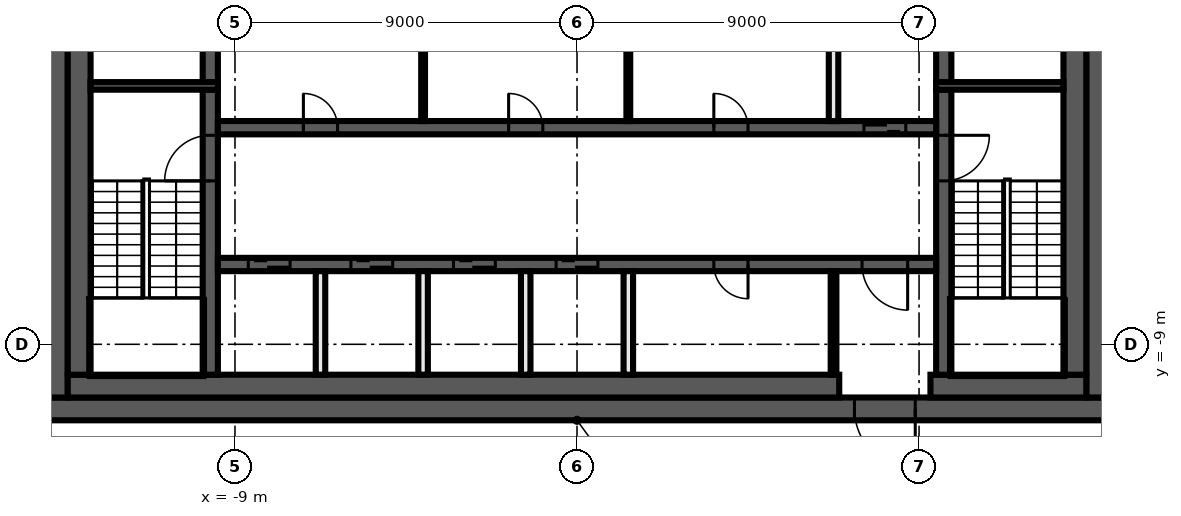
"""IFC4 building model, lengths in metres.
Left out: names, types, materials, properties, quantities, classifications, styles, units other than length and angle.
Written with IfcOpenShell. Run it as: python <this file> out.ifc"""

import sys

from ifc_helpers import new_model, si_unit, direction, frame, frame_2d, origin, place, context, subcontext, project, spatial, rectangle, extrude, element, fill, save


model = new_model("IFC4")
c1 = context("Model", 3, precision=1e-05, world=origin(), true_north=direction((0.0, 1.0)))
c2 = subcontext(c1, "Body", "Model", "MODEL_VIEW")
j1 = project(units=[si_unit("LENGTHUNIT", "METRE"), si_unit("PLANEANGLEUNIT", "RADIAN")], contexts=[c1])
p1 = place(None, origin())
s1 = spatial("IfcSite", under=j1, at=p1, CompositionType="ELEMENT")
p2 = place(p1, origin())
s2 = spatial("IfcBuilding", under=s1, at=p2, CompositionType="ELEMENT")
p3 = place(p2, frame((0.0, 0.0, 323.6)))
s3 = spatial("IfcBuildingStorey", under=s2, at=p3, CompositionType="ELEMENT", Elevation=323.6)
p4 = place(p3, frame((14.0, -10.7, 0.0), z_axis=(0.0, 0.0, 1.0), x_axis=(-1.0, 0.0, 0.0)))
e1 = element("IfcWall", 1, at=p4, inside=s3, PredefinedType="SHEAR", context=c2, shape_type="SweptSolid", body=[
    extrude(rectangle(XDim=28.0, YDim=0.6, at=frame_2d((14.0, 0.0))), origin(), (0.0, 0.0, 1.0), 3.82),
])
p5 = place(p4, frame((5.1, 0.0, 0.0)))
e2 = element("IfcOpeningElement", 2, at=p5, cuts=e1, PredefinedType="OPENING", context=c2, shape_type="SweptSolid", body=[
    extrude(rectangle(XDim=1.6, YDim=2.1, at=frame_2d((0.8, 1.05))), frame((0.0, 0.31, 0.0), z_axis=(0.0, -1.0, 0.0), x_axis=(1.0, 0.0, 0.0)), (0.0, 0.0, 1.0), 0.62),
])
for number, where, z_axis, x_axis in (
    (3, (13.7, 10.4, 0.0), (0.0, 0.0, 1.0), (0.0, -1.0, 0.0)),
    (4, (-13.7, -10.4, 0.0), (0.0, 0.0, 1.0), (0.0, 1.0, 0.0)),
):
    element("IfcWall", number, at=place(p3, frame(where, z_axis=z_axis, x_axis=x_axis)), inside=s3, PredefinedType="SHEAR", context=c2, shape_type="SweptSolid", body=[
        extrude(rectangle(XDim=20.8, YDim=0.6, at=frame_2d((10.4, 0.0))), origin(), (0.0, 0.0, 1.0), 3.82),
    ])
p6 = place(p3, frame((13.4, -10.1, 0.0), z_axis=(0.0, 0.0, 1.0), x_axis=(-1.0, 0.0, 0.0)))
e5 = element("IfcWall", 5, at=p6, inside=s3, PredefinedType="SHEAR", context=c2, shape_type="SweptSolid", body=[
    extrude(rectangle(XDim=4.1, YDim=0.6, at=frame_2d((2.05, 0.0))), origin(), (0.0, 0.0, 1.0), 3.82),
])
p7 = place(p3, frame((6.9, -10.1, 0.0), z_axis=(0.0, 0.0, 1.0), x_axis=(-1.0, 0.0, 0.0)))
e6 = element("IfcWall", 6, at=p7, inside=s3, PredefinedType="SHEAR", context=c2, shape_type="SweptSolid", body=[
    extrude(rectangle(XDim=20.3, YDim=0.6, at=frame_2d((10.15, 0.0))), origin(), (0.0, 0.0, 1.0), 3.82),
])
for number, where, z_axis, x_axis in (
    (7, (13.1, 9.8, 0.0), (0.0, 0.0, 1.0), (0.0, -1.0, 0.0)),
    (8, (-13.1, -9.8, 0.0), (0.0, 0.0, 1.0), (0.0, 1.0, 0.0)),
):
    element("IfcWall", number, at=place(p3, frame(where, z_axis=z_axis, x_axis=x_axis)), inside=s3, PredefinedType="SHEAR", context=c2, shape_type="SweptSolid", body=[
        extrude(rectangle(XDim=19.6, YDim=0.6, at=frame_2d((9.8, 0.0))), origin(), (0.0, 0.0, 1.0), 3.82),
    ])
p8 = place(p3, frame((9.65, -2.3, 0.0), z_axis=(0.0, 0.0, 1.0), x_axis=(0.0, -1.0, 0.0)))
e9 = element("IfcWall", 9, at=p8, inside=s3, PredefinedType="SHEAR", context=c2, shape_type="SweptSolid", body=[
    extrude(rectangle(XDim=7.5, YDim=0.4, at=frame_2d((3.75, 0.0))), origin(), (0.0, 0.0, 1.0), 3.82),
])
p9 = place(p8, frame((1.2, 0.0, 0.0)))
e10 = element("IfcOpeningElement", 10, at=p9, cuts=e9, PredefinedType="OPENING", context=c2, shape_type="SweptSolid", body=[
    extrude(rectangle(XDim=1.2, YDim=2.1, at=frame_2d((0.6, 1.05))), frame((0.0, 0.21, 0.0), z_axis=(0.0, -1.0, 0.0), x_axis=(1.0, 0.0, 0.0)), (0.0, 0.0, 1.0), 0.42),
])
p10 = place(p3, frame((9.65, 2.1, 0.0), z_axis=(0.0, 0.0, 1.0), x_axis=(0.0, -1.0, 0.0)))
e11 = element("IfcWall", 11, at=p10, inside=s3, PredefinedType="SHEAR", context=c2, shape_type="SweptSolid", body=[
    extrude(rectangle(XDim=4.2, YDim=0.4, at=frame_2d((2.1, 0.0))), origin(), (0.0, 0.0, 1.0), 3.82),
])
p11 = place(p10, frame((0.15, 0.0, 0.0)))
e12 = element("IfcOpeningElement", 12, at=p11, cuts=e11, PredefinedType="OPENING", context=c2, shape_type="SweptSolid", body=[
    extrude(rectangle(XDim=0.9, YDim=2.1, at=frame_2d((0.45, 1.05))), frame((0.0, 0.21, 0.0), z_axis=(0.0, -1.0, 0.0), x_axis=(1.0, 0.0, 0.0)), (0.0, 0.0, 1.0), 0.42),
])
p12 = place(p3, frame((-9.65, -9.8, 0.0), z_axis=(0.0, 0.0, 1.0), x_axis=(0.0, 1.0, 0.0)))
e13 = element("IfcWall", 13, at=p12, inside=s3, PredefinedType="SHEAR", context=c2, shape_type="SweptSolid", body=[
    extrude(rectangle(XDim=7.5, YDim=0.4, at=frame_2d((3.75, 0.0))), origin(), (0.0, 0.0, 1.0), 3.82),
])
p13 = place(p12, frame((5.1, 0.0, 0.0)))
e14 = element("IfcOpeningElement", 14, at=p13, cuts=e13, PredefinedType="OPENING", context=c2, shape_type="SweptSolid", body=[
    extrude(rectangle(XDim=1.2, YDim=2.1, at=frame_2d((0.6, 1.05))), frame((0.0, 0.21, 0.0), z_axis=(0.0, -1.0, 0.0), x_axis=(1.0, 0.0, 0.0)), (0.0, 0.0, 1.0), 0.42),
])
p14 = place(p3, frame((-9.65, -2.1, 0.0), z_axis=(0.0, 0.0, 1.0), x_axis=(0.0, 1.0, 0.0)))
e15 = element("IfcWall", 15, at=p14, inside=s3, PredefinedType="SHEAR", context=c2, shape_type="SweptSolid", body=[
    extrude(rectangle(XDim=4.2, YDim=0.4, at=frame_2d((2.1, 0.0))), origin(), (0.0, 0.0, 1.0), 3.82),
])
for number, where, z_axis, x_axis in (
    (16, (9.45, -2.2, 0.0), (0.0, 0.0, 1.0), (1.0, 0.0, 0.0)),
    (17, (-9.45, -2.2, 0.0), (0.0, 0.0, 1.0), (-1.0, 0.0, 0.0)),
):
    element("IfcWall", number, at=place(p3, frame(where, z_axis=z_axis, x_axis=x_axis)), inside=s3, PredefinedType="SHEAR", context=c2, shape_type="SweptSolid", body=[
        extrude(rectangle(XDim=3.35, YDim=0.2, at=frame_2d((1.675, 0.0))), origin(), (0.0, 0.0, 1.0), 3.82),
    ])
p15 = place(p3, frame((-9.45, -3.3, 0.0), z_axis=(0.0, 0.0, 1.0), x_axis=(1.0, 0.0, 0.0)))
e18 = element("IfcWall", 18, at=p15, inside=s3, PredefinedType="SHEAR", context=c2, shape_type="SweptSolid", body=[
    extrude(rectangle(XDim=18.9, YDim=0.35, at=frame_2d((9.45, 0.0))), origin(), (0.0, 0.0, 1.0), 3.82),
])
p16 = place(p15, frame((17.0, 0.0, 0.0)))
e19 = element("IfcOpeningElement", 19, at=p16, cuts=e18, PredefinedType="OPENING", context=c2, shape_type="SweptSolid", body=[
    extrude(rectangle(XDim=1.1, YDim=2.1, at=frame_2d((0.55, 1.05))), frame((0.0, 0.185, 0.0), z_axis=(0.0, -1.0, 0.0), x_axis=(1.0, 0.0, 0.0)), (0.0, 0.0, 1.0), 0.37),
])
p17 = place(p15, frame((2.25, 0.0, 0.0)))
e20 = element("IfcOpeningElement", 20, at=p17, cuts=e18, PredefinedType="OPENING", context=c2, shape_type="SweptSolid", body=[
    extrude(rectangle(XDim=0.9, YDim=2.1, at=frame_2d((0.45, 1.05))), frame((0.0, 0.185, 0.0), z_axis=(0.0, -1.0, 0.0), x_axis=(1.0, 0.0, 0.0)), (0.0, 0.0, 1.0), 0.37),
])
p18 = place(p15, frame((7.65, 0.0, 0.0)))
e21 = element("IfcOpeningElement", 21, at=p18, cuts=e18, PredefinedType="OPENING", context=c2, shape_type="SweptSolid", body=[
    extrude(rectangle(XDim=0.9, YDim=2.1, at=frame_2d((0.45, 1.05))), frame((0.0, 0.185, 0.0), z_axis=(0.0, -1.0, 0.0), x_axis=(1.0, 0.0, 0.0)), (0.0, 0.0, 1.0), 0.37),
])
p19 = place(p15, frame((13.05, 0.0, 0.0)))
e22 = element("IfcOpeningElement", 22, at=p19, cuts=e18, PredefinedType="OPENING", context=c2, shape_type="SweptSolid", body=[
    extrude(rectangle(XDim=0.9, YDim=2.1, at=frame_2d((0.45, 1.05))), frame((0.0, 0.185, 0.0), z_axis=(0.0, -1.0, 0.0), x_axis=(1.0, 0.0, 0.0)), (0.0, 0.0, 1.0), 0.37),
])
p20 = place(p3, frame((9.45, -6.9, 0.0), z_axis=(0.0, 0.0, 1.0), x_axis=(-1.0, 0.0, 0.0)))
e23 = element("IfcWall", 23, at=p20, inside=s3, PredefinedType="SHEAR", context=c2, shape_type="SweptSolid", body=[
    extrude(rectangle(XDim=18.9, YDim=0.35, at=frame_2d((9.45, 0.0))), origin(), (0.0, 0.0, 1.0), 3.82),
])
p21 = place(p20, frame((17.0, 0.0, 0.0)))
e24 = element("IfcOpeningElement", 24, at=p21, cuts=e23, PredefinedType="OPENING", context=c2, shape_type="SweptSolid", body=[
    extrude(rectangle(XDim=1.1, YDim=2.1, at=frame_2d((0.55, 1.05))), frame((0.0, 0.185, 0.0), z_axis=(0.0, -1.0, 0.0), x_axis=(1.0, 0.0, 0.0)), (0.0, 0.0, 1.0), 0.37),
])
p22 = place(p20, frame((14.3, 0.0, 0.0)))
e25 = element("IfcOpeningElement", 25, at=p22, cuts=e23, PredefinedType="OPENING", context=c2, shape_type="SweptSolid", body=[
    extrude(rectangle(XDim=1.1, YDim=2.1, at=frame_2d((0.55, 1.05))), frame((0.0, 0.185, 0.0), z_axis=(0.0, -1.0, 0.0), x_axis=(1.0, 0.0, 0.0)), (0.0, 0.0, 1.0), 0.37),
])
p23 = place(p20, frame((11.6, 0.0, 0.0)))
e26 = element("IfcOpeningElement", 26, at=p23, cuts=e23, PredefinedType="OPENING", context=c2, shape_type="SweptSolid", body=[
    extrude(rectangle(XDim=1.1, YDim=2.1, at=frame_2d((0.55, 1.05))), frame((0.0, 0.185, 0.0), z_axis=(0.0, -1.0, 0.0), x_axis=(1.0, 0.0, 0.0)), (0.0, 0.0, 1.0), 0.37),
])
p24 = place(p20, frame((8.9, 0.0, 0.0)))
e27 = element("IfcOpeningElement", 27, at=p24, cuts=e23, PredefinedType="OPENING", context=c2, shape_type="SweptSolid", body=[
    extrude(rectangle(XDim=1.1, YDim=2.1, at=frame_2d((0.55, 1.05))), frame((0.0, 0.185, 0.0), z_axis=(0.0, -1.0, 0.0), x_axis=(1.0, 0.0, 0.0)), (0.0, 0.0, 1.0), 0.37),
])
p25 = place(p20, frame((0.75, 0.0, 0.0)))
e28 = element("IfcOpeningElement", 28, at=p25, cuts=e23, PredefinedType="OPENING", context=c2, shape_type="SweptSolid", body=[
    extrude(rectangle(XDim=1.2, YDim=2.1, at=frame_2d((0.6, 1.05))), frame((0.0, 0.185, 0.0), z_axis=(0.0, -1.0, 0.0), x_axis=(1.0, 0.0, 0.0)), (0.0, 0.0, 1.0), 0.37),
])
p26 = place(p20, frame((4.95, 0.0, 0.0)))
e29 = element("IfcOpeningElement", 29, at=p26, cuts=e23, PredefinedType="OPENING", context=c2, shape_type="SweptSolid", body=[
    extrude(rectangle(XDim=0.9, YDim=2.1, at=frame_2d((0.45, 1.05))), frame((0.0, 0.185, 0.0), z_axis=(0.0, -1.0, 0.0), x_axis=(1.0, 0.0, 0.0)), (0.0, 0.0, 1.0), 0.37),
])
p27 = place(p3, frame((6.75, -9.8, 0.0), z_axis=(0.0, 0.0, 1.0), x_axis=(0.0, 1.0, 0.0)))
e30 = element("IfcWall", 30, at=p27, inside=s3, PredefinedType="PARTITIONING", context=c2, shape_type="SweptSolid", body=[
    extrude(rectangle(XDim=2.725, YDim=0.15, at=frame_2d((1.363, 0.0))), origin(), (0.0, 0.0, 1.0), 3.82),
])
p28 = place(p3, frame((6.75, -3.125, 0.0), z_axis=(0.0, 0.0, 1.0), x_axis=(0.0, 1.0, 0.0)))
e31 = element("IfcWall", 31, at=p28, inside=s3, PredefinedType="SOLIDWALL", context=c2, shape_type="SweptSolid", body=[
    extrude(rectangle(XDim=2.725, YDim=0.25, at=frame_2d((1.363, 0.0))), origin(), (0.0, 0.0, 1.0), 3.82),
])
p29 = place(p3, frame((1.35, -3.125, 0.0), z_axis=(0.0, 0.0, 1.0), x_axis=(0.0, 1.0, 0.0)))
e32 = element("IfcWall", 32, at=p29, inside=s3, PredefinedType="PARTITIONING", context=c2, shape_type="SweptSolid", body=[
    extrude(rectangle(XDim=2.725, YDim=0.1, at=frame_2d((1.363, 0.0))), origin(), (0.0, 0.0, 1.0), 3.82),
])
for number, where, z_axis, x_axis in (
    (33, (1.35, -9.8, 0.0), (0.0, 0.0, 1.0), (0.0, 1.0, 0.0)),
    (34, (-1.35, -9.8, 0.0), (0.0, 0.0, 1.0), (0.0, 1.0, 0.0)),
):
    element("IfcWall", number, at=place(p3, frame(where, z_axis=z_axis, x_axis=x_axis)), inside=s3, PredefinedType="SOLIDWALL", context=c2, shape_type="SweptSolid", body=[
        extrude(rectangle(XDim=2.725, YDim=0.25, at=frame_2d((1.363, 0.0))), origin(), (0.0, 0.0, 1.0), 3.82),
    ])
p30 = place(p3, frame((-4.05, -3.125, 0.0), z_axis=(0.0, 0.0, 1.0), x_axis=(0.0, 1.0, 0.0)))
e35 = element("IfcWall", 35, at=p30, inside=s3, PredefinedType="PARTITIONING", context=c2, shape_type="SweptSolid", body=[
    extrude(rectangle(XDim=2.725, YDim=0.1, at=frame_2d((1.363, 0.0))), origin(), (0.0, 0.0, 1.0), 3.82),
])
for number, where, z_axis, x_axis in (
    (36, (-4.05, -9.8, 0.0), (0.0, 0.0, 1.0), (0.0, 1.0, 0.0)),
    (37, (-6.75, -9.8, 0.0), (0.0, 0.0, 1.0), (0.0, 1.0, 0.0)),
):
    element("IfcWall", number, at=place(p3, frame(where, z_axis=z_axis, x_axis=x_axis)), inside=s3, PredefinedType="SOLIDWALL", context=c2, shape_type="SweptSolid", body=[
        extrude(rectangle(XDim=2.725, YDim=0.25, at=frame_2d((1.363, 0.0))), origin(), (0.0, 0.0, 1.0), 3.82),
    ])
p31 = place(p16, origin())
e38 = element("IfcDoor", 38, at=p31, inside=s3, OperationType="DOUBLE_DOOR_SLIDING", PredefinedType="DOOR", context=c2, shape_type="SweptSolid", body=[
    extrude(rectangle(XDim=1.1, YDim=2.1, at=frame_2d((0.55, 1.05))), frame((0.0, 0.025, 0.0), z_axis=(0.0, -1.0, 0.0), x_axis=(1.0, 0.0, 0.0)), (0.0, 0.0, 1.0), 0.05),
])
fill(e19, e38)
p32 = place(p21, origin())
e39 = element("IfcDoor", 39, at=p32, inside=s3, OperationType="DOUBLE_DOOR_SLIDING", PredefinedType="DOOR", context=c2, shape_type="SweptSolid", body=[
    extrude(rectangle(XDim=1.1, YDim=2.1, at=frame_2d((0.55, 1.05))), frame((0.0, 0.025, 0.0), z_axis=(0.0, -1.0, 0.0), x_axis=(1.0, 0.0, 0.0)), (0.0, 0.0, 1.0), 0.05),
])
fill(e24, e39)
p33 = place(p22, origin())
e40 = element("IfcDoor", 40, at=p33, inside=s3, OperationType="DOUBLE_DOOR_SLIDING", PredefinedType="DOOR", context=c2, shape_type="SweptSolid", body=[
    extrude(rectangle(XDim=1.1, YDim=2.1, at=frame_2d((0.55, 1.05))), frame((0.0, 0.025, 0.0), z_axis=(0.0, -1.0, 0.0), x_axis=(1.0, 0.0, 0.0)), (0.0, 0.0, 1.0), 0.05),
])
fill(e25, e40)
p34 = place(p23, origin())
e41 = element("IfcDoor", 41, at=p34, inside=s3, OperationType="DOUBLE_DOOR_SLIDING", PredefinedType="DOOR", context=c2, shape_type="SweptSolid", body=[
    extrude(rectangle(XDim=1.1, YDim=2.1, at=frame_2d((0.55, 1.05))), frame((0.0, 0.025, 0.0), z_axis=(0.0, -1.0, 0.0), x_axis=(1.0, 0.0, 0.0)), (0.0, 0.0, 1.0), 0.05),
])
fill(e26, e41)
p35 = place(p24, origin())
e42 = element("IfcDoor", 42, at=p35, inside=s3, OperationType="DOUBLE_DOOR_SLIDING", PredefinedType="DOOR", context=c2, shape_type="SweptSolid", body=[
    extrude(rectangle(XDim=1.1, YDim=2.1, at=frame_2d((0.55, 1.05))), frame((0.0, 0.025, 0.0), z_axis=(0.0, -1.0, 0.0), x_axis=(1.0, 0.0, 0.0)), (0.0, 0.0, 1.0), 0.05),
])
fill(e27, e42)
p36 = place(p5, origin())
e43 = element("IfcDoor", 43, at=p36, inside=s3, OperationType="DOUBLE_DOOR_SINGLE_SWING", PredefinedType="DOOR", context=c2, shape_type="SweptSolid", body=[
    extrude(rectangle(XDim=1.6, YDim=2.1, at=frame_2d((0.8, 1.05))), frame((0.0, 0.025, 0.0), z_axis=(0.0, -1.0, 0.0), x_axis=(1.0, 0.0, 0.0)), (0.0, 0.0, 1.0), 0.05),
])
fill(e2, e43)
p37 = place(p25, origin())
e44 = element("IfcDoor", 44, at=p37, inside=s3, OperationType="SINGLE_SWING_LEFT", PredefinedType="DOOR", context=c2, shape_type="SweptSolid", body=[
    extrude(rectangle(XDim=1.2, YDim=2.1, at=frame_2d((0.6, 1.05))), frame((0.0, 0.025, 0.0), z_axis=(0.0, -1.0, 0.0), x_axis=(1.0, 0.0, 0.0)), (0.0, 0.0, 1.0), 0.05),
])
fill(e28, e44)
p38 = place(p17, origin())
e45 = element("IfcDoor", 45, at=p38, inside=s3, OperationType="SINGLE_SWING_LEFT", PredefinedType="DOOR", context=c2, shape_type="SweptSolid", body=[
    extrude(rectangle(XDim=0.9, YDim=2.1, at=frame_2d((0.45, 1.05))), frame((0.0, 0.025, 0.0), z_axis=(0.0, -1.0, 0.0), x_axis=(1.0, 0.0, 0.0)), (0.0, 0.0, 1.0), 0.05),
])
fill(e20, e45)
p39 = place(p18, origin())
e46 = element("IfcDoor", 46, at=p39, inside=s3, OperationType="SINGLE_SWING_RIGHT", PredefinedType="DOOR", context=c2, shape_type="SweptSolid", body=[
    extrude(rectangle(XDim=0.9, YDim=2.1, at=frame_2d((0.45, 1.05))), frame((0.0, 0.025, 0.0), z_axis=(0.0, -1.0, 0.0), x_axis=(1.0, 0.0, 0.0)), (0.0, 0.0, 1.0), 0.05),
])
fill(e21, e46)
p40 = place(p19, origin())
e47 = element("IfcDoor", 47, at=p40, inside=s3, OperationType="SINGLE_SWING_LEFT", PredefinedType="DOOR", context=c2, shape_type="SweptSolid", body=[
    extrude(rectangle(XDim=0.9, YDim=2.1, at=frame_2d((0.45, 1.05))), frame((0.0, 0.025, 0.0), z_axis=(0.0, -1.0, 0.0), x_axis=(1.0, 0.0, 0.0)), (0.0, 0.0, 1.0), 0.05),
])
fill(e22, e47)
p41 = place(p26, origin())
e48 = element("IfcDoor", 48, at=p41, inside=s3, OperationType="SINGLE_SWING_RIGHT", PredefinedType="DOOR", context=c2, shape_type="SweptSolid", body=[
    extrude(rectangle(XDim=0.9, YDim=2.1, at=frame_2d((0.45, 1.05))), frame((0.0, 0.025, 0.0), z_axis=(0.0, -1.0, 0.0), x_axis=(1.0, 0.0, 0.0)), (0.0, 0.0, 1.0), 0.05),
])
fill(e29, e48)
p42 = place(p9, origin())
e49 = element("IfcDoor", 49, at=p42, inside=s3, OperationType="SINGLE_SWING_RIGHT", PredefinedType="DOOR", context=c2, shape_type="SweptSolid", body=[
    extrude(rectangle(XDim=1.2, YDim=2.1, at=frame_2d((0.6, 1.05))), frame((0.0, 0.025, 0.0), z_axis=(0.0, -1.0, 0.0), x_axis=(1.0, 0.0, 0.0)), (0.0, 0.0, 1.0), 0.05),
])
fill(e10, e49)
p43 = place(p13, origin())
e50 = element("IfcDoor", 50, at=p43, inside=s3, OperationType="SINGLE_SWING_LEFT", PredefinedType="DOOR", context=c2, shape_type="SweptSolid", body=[
    extrude(rectangle(XDim=1.2, YDim=2.1, at=frame_2d((0.6, 1.05))), frame((0.0, 0.025, 0.0), z_axis=(0.0, -1.0, 0.0), x_axis=(1.0, 0.0, 0.0)), (0.0, 0.0, 1.0), 0.05),
])
fill(e14, e50)
save(model, sys.argv[1])
